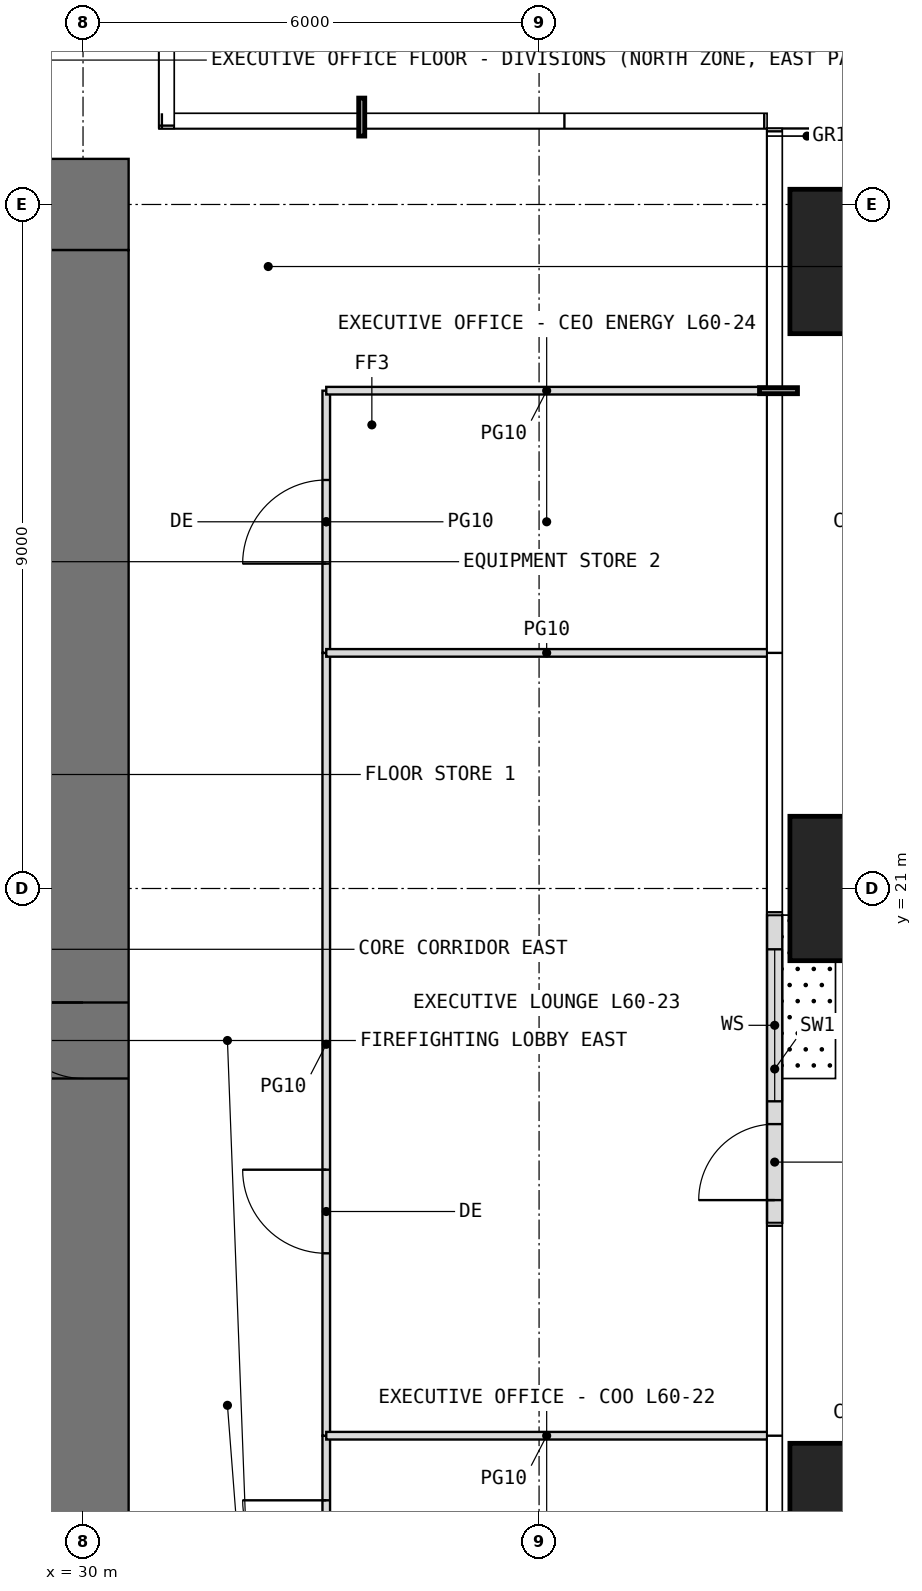
"""IFC4 building model, lengths in metres.
Left out: names, types, materials, properties, quantities, classifications, styles, units other than length and angle.
Written with IfcOpenShell. Run it as: python <this file> out.ifc"""

import sys

from ifc_helpers import new_model, si_unit, direction, frame, frame_2d, origin, origin_2d, place, context, subcontext, project, spatial, rectangle, extrude, element, fill, save


model = new_model("IFC4")
c1 = context("Model", 3, precision=1e-05, world=origin(), true_north=direction((0.0, 1.0)))
c2 = subcontext(c1, "Body", "Model", "MODEL_VIEW")
j1 = project(units=[si_unit("LENGTHUNIT", "METRE"), si_unit("PLANEANGLEUNIT", "RADIAN")], contexts=[c1])
p1 = place(None, origin())
s1 = spatial("IfcSite", under=j1, at=p1, CompositionType="ELEMENT")
p2 = place(p1, origin())
s2 = spatial("IfcBuilding", under=s1, at=p2, CompositionType="ELEMENT")
p3 = place(p2, frame((0.0, 0.0, 252.4)))
s3 = spatial("IfcBuildingStorey", under=s2, at=p3, CompositionType="ELEMENT", Elevation=252.4)
for number, where, z_axis, x_axis in (
    (1, (40.25, 12.75, 0.0), (0.0, 0.0, 1.0), (1.0, 0.0, 0.0)),
    (2, (40.25, 21.0, 0.0), (0.0, 0.0, 1.0), (1.0, 0.0, 0.0)),
    (3, (40.25, 29.25, 0.0), (0.0, 0.0, 1.0), (1.0, 0.0, 0.0)),
):
    element("IfcColumn", number, at=place(p3, frame(where, z_axis=z_axis, x_axis=x_axis)), inside=s3, PredefinedType="COLUMN", context=c2, shape_type="SweptSolid", body=[
        extrude(rectangle(XDim=1.9, YDim=1.9, at=origin_2d()), origin(), (0.0, 0.0, 1.0), 4.2),
    ])
p4 = place(p3, frame((39.1, 16.6, 0.0), z_axis=(0.0, 0.0, 1.0), x_axis=(0.0, 1.0, 0.0)))
e4 = element("IfcWall", 4, at=p4, inside=s3, PredefinedType="USERDEFINED", context=c2, shape_type="SweptSolid", body=[
    extrude(rectangle(XDim=4.05, YDim=0.2, at=frame_2d((2.025, 0.0))), origin(), (0.0, 0.0, 1.0), 3.95),
])
p5 = place(p4, frame((0.3, 0.0, 0.0)))
e5 = element("IfcOpeningElement", 5, at=p5, cuts=e4, PredefinedType="OPENING", context=c2, shape_type="SweptSolid", body=[
    extrude(rectangle(XDim=1.0, YDim=2.4, at=frame_2d((0.5, 1.2))), frame((0.0, 0.11, 0.0), z_axis=(0.0, -1.0, 0.0), x_axis=(1.0, 0.0, 0.0)), (0.0, 0.0, 1.0), 0.22),
])
p6 = place(p4, frame((1.6, 0.0, 0.3)))
e6 = element("IfcOpeningElement", 6, at=p6, cuts=e4, PredefinedType="OPENING", context=c2, shape_type="SweptSolid", body=[
    extrude(rectangle(XDim=2.0, YDim=2.7, at=frame_2d((1.0, 1.35))), frame((0.0, 0.11, 0.0), z_axis=(0.0, -1.0, 0.0), x_axis=(1.0, 0.0, 0.0)), (0.0, 0.0, 1.0), 0.22),
])
p7 = place(p3, frame((11.4, 30.0, -0.05), z_axis=(0.0, 0.0, 1.0), x_axis=(1.0, 0.0, 0.0)))
e7 = element("IfcWall", 7, at=p7, inside=s3, PredefinedType="SHEAR", context=c2, shape_type="SweptSolid", body=[
    extrude(rectangle(XDim=19.2, YDim=1.2, at=frame_2d((9.6, 0.0))), origin(), (0.0, 0.0, 1.0), 4.2),
])
p8 = place(p7, frame((8.6, 0.0, 0.05)))
e8 = element("IfcOpeningElement", 8, at=p8, cuts=e7, PredefinedType="OPENING", context=c2, shape_type="SweptSolid", body=[
    extrude(rectangle(XDim=2.0, YDim=2.2, at=frame_2d((1.0, 1.1))), frame((0.0, 0.61, 0.0), z_axis=(0.0, -1.0, 0.0), x_axis=(1.0, 0.0, 0.0)), (0.0, 0.0, 1.0), 1.22),
])
p9 = place(p3, frame((30.0, 12.6, -0.05), z_axis=(0.0, 0.0, 1.0), x_axis=(0.0, 1.0, 0.0)))
e9 = element("IfcWall", 9, at=p9, inside=s3, PredefinedType="SHEAR", context=c2, shape_type="SweptSolid", body=[
    extrude(rectangle(XDim=16.8, YDim=1.2, at=frame_2d((8.4, 0.0))), origin(), (0.0, 0.0, 1.0), 4.2),
])
p10 = place(p9, frame((5.9, 0.0, 0.05)))
e10 = element("IfcOpeningElement", 10, at=p10, cuts=e9, PredefinedType="OPENING", context=c2, shape_type="SweptSolid", body=[
    extrude(rectangle(XDim=1.0, YDim=2.2, at=frame_2d((0.5, 1.1))), frame((0.0, 0.61, 0.0), z_axis=(0.0, -1.0, 0.0), x_axis=(1.0, 0.0, 0.0)), (0.0, 0.0, 1.0), 1.22),
])
p11 = place(p3, frame((33.2, 11.0, 0.0), z_axis=(0.0, 0.0, 1.0), x_axis=(0.0, 1.0, 0.0)))
e11 = element("IfcWall", 11, at=p11, inside=s3, PredefinedType="PARTITIONING", context=c2, shape_type="SweptSolid", body=[
    extrude(rectangle(XDim=2.8, YDim=0.1, at=frame_2d((1.4, 0.0))), origin(), (0.0, 0.0, 1.0), 3.95),
])
p12 = place(p11, frame((0.85, 0.0, 0.0)))
e12 = element("IfcOpeningElement", 12, at=p12, cuts=e11, PredefinedType="OPENING", context=c2, shape_type="SweptSolid", body=[
    extrude(rectangle(XDim=1.1, YDim=2.3, at=frame_2d((0.55, 1.15))), frame((0.0, 0.06, 0.0), z_axis=(0.0, -1.0, 0.0), x_axis=(1.0, 0.0, 0.0)), (0.0, 0.0, 1.0), 0.12),
])
p13 = place(p3, frame((33.2, 13.8, 0.0), z_axis=(0.0, 0.0, 1.0), x_axis=(0.0, 1.0, 0.0)))
e13 = element("IfcWall", 13, at=p13, inside=s3, PredefinedType="PARTITIONING", context=c2, shape_type="SweptSolid", body=[
    extrude(rectangle(XDim=10.3, YDim=0.1, at=frame_2d((5.15, 0.0))), origin(), (0.0, 0.0, 1.0), 3.95),
])
p14 = place(p13, frame((2.4, 0.0, 0.0)))
e14 = element("IfcOpeningElement", 14, at=p14, cuts=e13, PredefinedType="OPENING", context=c2, shape_type="SweptSolid", body=[
    extrude(rectangle(XDim=1.1, YDim=2.3, at=frame_2d((0.55, 1.15))), frame((0.0, 0.06, 0.0), z_axis=(0.0, -1.0, 0.0), x_axis=(1.0, 0.0, 0.0)), (0.0, 0.0, 1.0), 0.12),
])
p15 = place(p3, frame((33.2, 13.8, 0.0), z_axis=(0.0, 0.0, 1.0), x_axis=(1.0, 0.0, 0.0)))
e15 = element("IfcWall", 15, at=p15, inside=s3, PredefinedType="PARTITIONING", context=c2, shape_type="SweptSolid", body=[
    extrude(rectangle(XDim=5.8, YDim=0.1, at=frame_2d((2.9, 0.0))), origin(), (0.0, 0.0, 1.0), 3.95),
])
p16 = place(p3, frame((33.2, 24.1, 0.0), z_axis=(0.0, 0.0, 1.0), x_axis=(0.0, 1.0, 0.0)))
e16 = element("IfcWall", 16, at=p16, inside=s3, PredefinedType="PARTITIONING", context=c2, shape_type="SweptSolid", body=[
    extrude(rectangle(XDim=3.45, YDim=0.1, at=frame_2d((1.725, 0.0))), origin(), (0.0, 0.0, 1.0), 3.95),
])
p17 = place(p16, frame((1.175, 0.0, 0.0)))
e17 = element("IfcOpeningElement", 17, at=p17, cuts=e16, PredefinedType="OPENING", context=c2, shape_type="SweptSolid", body=[
    extrude(rectangle(XDim=1.1, YDim=2.3, at=frame_2d((0.55, 1.15))), frame((0.0, 0.06, 0.0), z_axis=(0.0, -1.0, 0.0), x_axis=(1.0, 0.0, 0.0)), (0.0, 0.0, 1.0), 0.12),
])
for number, where, z_axis, x_axis in (
    (18, (33.2, 24.1, 0.0), (0.0, 0.0, 1.0), (1.0, 0.0, 0.0)),
    (19, (33.2, 27.55, 0.0), (0.0, 0.0, 1.0), (1.0, 0.0, 0.0)),
):
    element("IfcWall", number, at=place(p3, frame(where, z_axis=z_axis, x_axis=x_axis)), inside=s3, PredefinedType="PARTITIONING", context=c2, shape_type="SweptSolid", body=[
        extrude(rectangle(XDim=5.8, YDim=0.1, at=frame_2d((2.9, 0.0))), origin(), (0.0, 0.0, 1.0), 3.95),
    ])
p18 = place(p5, origin())
e20 = element("IfcDoor", 20, at=p18, inside=s3, OperationType="SINGLE_SWING_LEFT", PredefinedType="DOOR", context=c2, shape_type="SweptSolid", body=[
    extrude(rectangle(XDim=1.0, YDim=2.4, at=frame_2d((0.5, 1.2))), frame((0.0, 0.025, 0.0), z_axis=(0.0, -1.0, 0.0), x_axis=(1.0, 0.0, 0.0)), (0.0, 0.0, 1.0), 0.05),
])
fill(e5, e20)
p19 = place(p6, origin())
e21 = element("IfcWindow", 21, at=p19, inside=s3, PartitioningType="SINGLE_PANEL", PredefinedType="WINDOW", context=c2, shape_type="SweptSolid", body=[
    extrude(rectangle(XDim=2.0, YDim=2.7, at=frame_2d((1.0, 1.35))), frame((0.0, 0.03, 0.0), z_axis=(0.0, -1.0, 0.0), x_axis=(1.0, 0.0, 0.0)), (0.0, 0.0, 1.0), 0.06),
])
fill(e6, e21)
p20 = place(p10, origin())
e22 = element("IfcDoor", 22, at=p20, inside=s3, OperationType="SINGLE_SWING_RIGHT", PredefinedType="DOOR", context=c2, shape_type="SweptSolid", body=[
    extrude(rectangle(XDim=1.0, YDim=2.2, at=frame_2d((0.5, 1.1))), frame((0.0, 0.025, 0.0), z_axis=(0.0, -1.0, 0.0), x_axis=(1.0, 0.0, 0.0)), (0.0, 0.0, 1.0), 0.05),
])
fill(e10, e22)
p21 = place(p12, origin())
e23 = element("IfcDoor", 23, at=p21, inside=s3, OperationType="SINGLE_SWING_RIGHT", PredefinedType="DOOR", context=c2, shape_type="SweptSolid", body=[
    extrude(rectangle(XDim=1.1, YDim=2.3, at=frame_2d((0.55, 1.15))), frame((0.0, 0.025, 0.0), z_axis=(0.0, -1.0, 0.0), x_axis=(1.0, 0.0, 0.0)), (0.0, 0.0, 1.0), 0.05),
])
fill(e12, e23)
p22 = place(p14, origin())
e24 = element("IfcDoor", 24, at=p22, inside=s3, OperationType="SINGLE_SWING_RIGHT", PredefinedType="DOOR", context=c2, shape_type="SweptSolid", body=[
    extrude(rectangle(XDim=1.1, YDim=2.3, at=frame_2d((0.55, 1.15))), frame((0.0, 0.025, 0.0), z_axis=(0.0, -1.0, 0.0), x_axis=(1.0, 0.0, 0.0)), (0.0, 0.0, 1.0), 0.05),
])
fill(e14, e24)
p23 = place(p17, origin())
e25 = element("IfcDoor", 25, at=p23, inside=s3, OperationType="SINGLE_SWING_LEFT", PredefinedType="DOOR", context=c2, shape_type="SweptSolid", body=[
    extrude(rectangle(XDim=1.1, YDim=2.3, at=frame_2d((0.55, 1.15))), frame((0.0, 0.025, 0.0), z_axis=(0.0, -1.0, 0.0), x_axis=(1.0, 0.0, 0.0)), (0.0, 0.0, 1.0), 0.05),
])
fill(e17, e25)
save(model, sys.argv[1])
